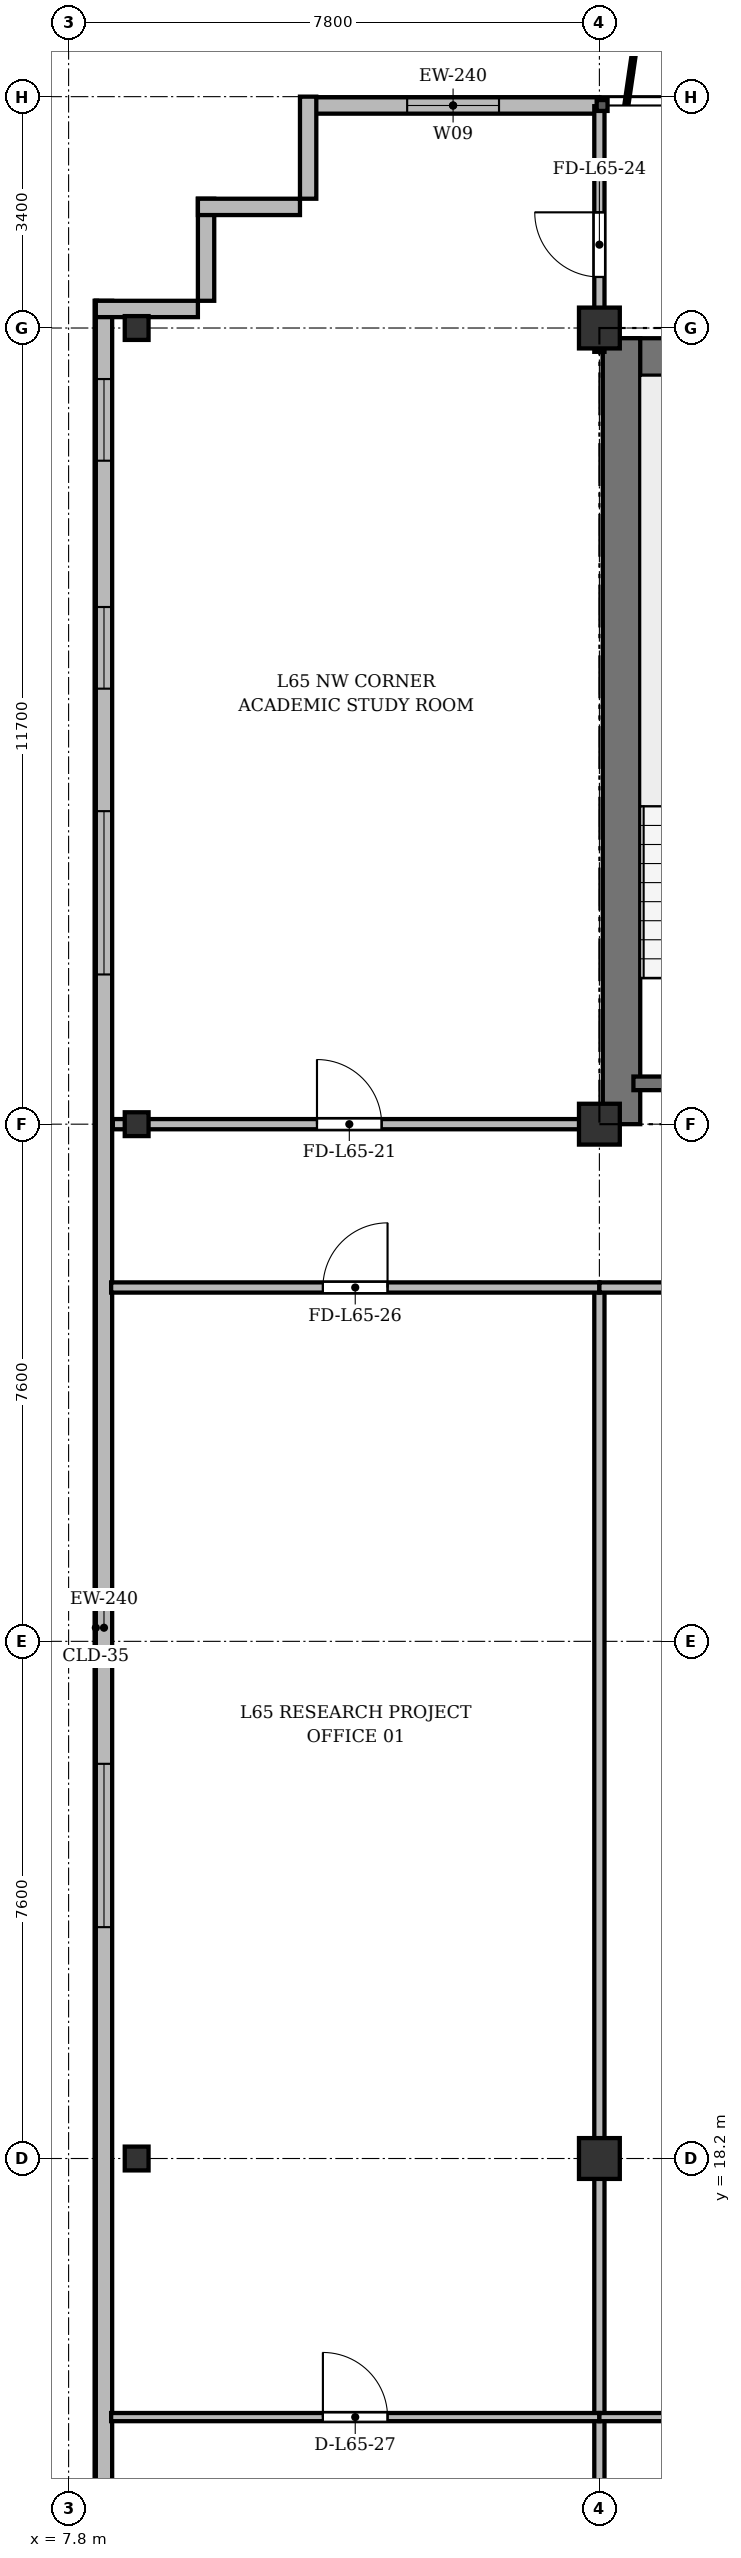
"""IFC4 building model, lengths in metres.
Left out: names, types, materials, properties, quantities, classifications, styles, units other than length and angle.
Written with IfcOpenShell. Run it as: python <this file> out.ifc"""

import sys

from ifc_helpers import new_model, si_unit, direction, frame, frame_2d, origin, origin_2d, place, context, subcontext, project, spatial, rectangle, i_section, extrude, source, transform, mapped, element, fill, save


model = new_model("IFC4")
c1 = context("Model", 3, precision=1e-05, world=origin(), true_north=direction((0.0, 1.0)))
c2 = subcontext(c1, "Body", "Model", "MODEL_VIEW")
j1 = project(units=[si_unit("LENGTHUNIT", "METRE"), si_unit("PLANEANGLEUNIT", "RADIAN")], contexts=[c1])
p1 = place(None, origin())
s1 = spatial("IfcSite", under=j1, at=p1, CompositionType="ELEMENT")
p2 = place(p1, origin())
s2 = spatial("IfcBuilding", under=s1, at=p2, CompositionType="ELEMENT")
p3 = place(p2, frame((0.0, 0.0, 252.3)))
s3 = spatial("IfcBuildingStorey", under=s2, at=p3, CompositionType="ELEMENT", Elevation=252.3)
m1 = source(origin(), c2, "Body", "SweptSolid", [
    extrude(i_section(OverallWidth=0.35, OverallDepth=0.35, WebThickness=0.018, FlangeThickness=0.028, at=origin_2d()), origin(), (0.0, 0.0, 1.0), 3.6),
])
for number, where, z_axis, x_axis in (
    (1, (8.8, 18.2, 0.0), (0.0, 0.0, 1.0), (1.0, 0.0, 0.0)),
    (2, (8.8, 33.4, 0.0), (0.0, 0.0, 1.0), (1.0, 0.0, 0.0)),
    (3, (8.8, 45.1, 0.0), (0.0, 0.0, 1.0), (1.0, 0.0, 0.0)),
):
    element("IfcColumn", number, at=place(p3, frame(where, z_axis=z_axis, x_axis=x_axis)), inside=s3, PredefinedType="COLUMN", context=c2, shape_type="MappedRepresentation", body=[
        mapped(m1, transform((0.0, 0.0, 0.0), x_axis=(1.0, 0.0, 0.0), y_axis=(0.0, 1.0, 0.0), z_axis=(0.0, 0.0, 1.0), scale=1.0)),
    ])
m2 = source(origin(), c2, "Body", "SweptSolid", [
    extrude(rectangle(XDim=0.6, YDim=0.6, at=origin_2d()), origin(), (0.0, 0.0, 1.0), 3.6),
])
for number, where, z_axis, x_axis in (
    (4, (15.6, 18.2, 0.0), (0.0, 0.0, 1.0), (1.0, 0.0, 0.0)),
    (5, (15.6, 33.4, 0.0), (0.0, 0.0, 1.0), (1.0, 0.0, 0.0)),
    (6, (15.6, 45.1, 0.0), (0.0, 0.0, 1.0), (1.0, 0.0, 0.0)),
):
    element("IfcColumn", number, at=place(p3, frame(where, z_axis=z_axis, x_axis=x_axis)), inside=s3, PredefinedType="COLUMN", context=c2, shape_type="MappedRepresentation", body=[
        mapped(m2, transform((0.0, 0.0, 0.0), x_axis=(1.0, 0.0, 0.0), y_axis=(0.0, 1.0, 0.0), z_axis=(0.0, 0.0, 1.0), scale=1.0)),
    ])
p4 = place(p3, frame((11.3, 48.37, 0.0), z_axis=(0.0, 0.0, 1.0), x_axis=(1.0, 0.0, 0.0)))
e7 = element("IfcWall", 7, at=p4, inside=s3, PredefinedType="SOLIDWALL", context=c2, shape_type="SweptSolid", body=[
    extrude(rectangle(XDim=4.3, YDim=0.24, at=frame_2d((2.15, 0.0))), origin(), (0.0, 0.0, 1.0), 3.37),
])
p5 = place(p4, frame((1.475, 0.0, 0.9)))
e8 = element("IfcOpeningElement", 8, at=p5, cuts=e7, PredefinedType="OPENING", context=c2, shape_type="SweptSolid", body=[
    extrude(rectangle(XDim=1.35, YDim=1.5, at=frame_2d((0.675, 0.75))), frame((0.0, 0.13, 0.0), z_axis=(0.0, -1.0, 0.0), x_axis=(1.0, 0.0, 0.0)), (0.0, 0.0, 1.0), 0.26),
])
p6 = place(p3, frame((8.32, 6.5, 0.0), z_axis=(0.0, 0.0, 1.0), x_axis=(0.0, 1.0, 0.0)))
e9 = element("IfcWall", 9, at=p6, inside=s3, PredefinedType="SOLIDWALL", context=c2, shape_type="SweptSolid", body=[
    extrude(rectangle(XDim=39.0, YDim=0.24, at=frame_2d((19.5, 0.0))), origin(), (0.0, 0.0, 1.0), 3.37),
])
p7 = place(p6, frame((1.45, 0.0, 0.92)))
e10 = element("IfcOpeningElement", 10, at=p7, cuts=e9, PredefinedType="OPENING", context=c2, shape_type="SweptSolid", body=[
    extrude(rectangle(XDim=1.2, YDim=1.65, at=frame_2d((0.6, 0.825))), frame((0.0, 0.13, 0.0), z_axis=(0.0, -1.0, 0.0), x_axis=(1.0, 0.0, 0.0)), (0.0, 0.0, 1.0), 0.26),
])
p8 = place(p6, frame((3.7, 0.0, 0.92)))
e11 = element("IfcOpeningElement", 11, at=p8, cuts=e9, PredefinedType="OPENING", context=c2, shape_type="SweptSolid", body=[
    extrude(rectangle(XDim=2.4, YDim=2.1, at=frame_2d((1.2, 1.05))), frame((0.0, 0.13, 0.0), z_axis=(0.0, -1.0, 0.0), x_axis=(1.0, 0.0, 0.0)), (0.0, 0.0, 1.0), 0.26),
])
p9 = place(p6, frame((15.1, 0.0, 0.92)))
e12 = element("IfcOpeningElement", 12, at=p9, cuts=e9, PredefinedType="OPENING", context=c2, shape_type="SweptSolid", body=[
    extrude(rectangle(XDim=2.4, YDim=2.1, at=frame_2d((1.2, 1.05))), frame((0.0, 0.13, 0.0), z_axis=(0.0, -1.0, 0.0), x_axis=(1.0, 0.0, 0.0)), (0.0, 0.0, 1.0), 0.26),
])
p10 = place(p6, frame((29.1, 0.0, 0.92)))
e13 = element("IfcOpeningElement", 13, at=p10, cuts=e9, PredefinedType="OPENING", context=c2, shape_type="SweptSolid", body=[
    extrude(rectangle(XDim=2.4, YDim=2.1, at=frame_2d((1.2, 1.05))), frame((0.0, 0.13, 0.0), z_axis=(0.0, -1.0, 0.0), x_axis=(1.0, 0.0, 0.0)), (0.0, 0.0, 1.0), 0.26),
])
p11 = place(p6, frame((33.3, 0.0, 0.92)))
e14 = element("IfcOpeningElement", 14, at=p11, cuts=e9, PredefinedType="OPENING", context=c2, shape_type="SweptSolid", body=[
    extrude(rectangle(XDim=1.2, YDim=1.65, at=frame_2d((0.6, 0.825))), frame((0.0, 0.13, 0.0), z_axis=(0.0, -1.0, 0.0), x_axis=(1.0, 0.0, 0.0)), (0.0, 0.0, 1.0), 0.26),
])
p12 = place(p6, frame((36.65, 0.0, 0.92)))
e15 = element("IfcOpeningElement", 15, at=p12, cuts=e9, PredefinedType="OPENING", context=c2, shape_type="SweptSolid", body=[
    extrude(rectangle(XDim=1.2, YDim=1.65, at=frame_2d((0.6, 0.825))), frame((0.0, 0.13, 0.0), z_axis=(0.0, -1.0, 0.0), x_axis=(1.0, 0.0, 0.0)), (0.0, 0.0, 1.0), 0.26),
])
for number, where, z_axis, x_axis in (
    (16, (8.2, 45.38, 0.0), (0.0, 0.0, 1.0), (1.0, 0.0, 0.0)),
    (17, (9.82, 45.5, 0.0), (0.0, 0.0, 1.0), (0.0, 1.0, 0.0)),
    (18, (9.7, 46.88, 0.0), (0.0, 0.0, 1.0), (1.0, 0.0, 0.0)),
    (19, (11.32, 47.0, 0.0), (0.0, 0.0, 1.0), (0.0, 1.0, 0.0)),
):
    element("IfcWall", number, at=place(p3, frame(where, z_axis=z_axis, x_axis=x_axis)), inside=s3, PredefinedType="SOLIDWALL", context=c2, shape_type="SweptSolid", body=[
        extrude(rectangle(XDim=1.5, YDim=0.24, at=frame_2d((0.75, 0.0))), origin(), (0.0, 0.0, 1.0), 3.37),
    ])
p13 = place(p3, frame((15.65, 44.675, 0.0), z_axis=(0.0, 0.0, 1.0), x_axis=(1.0, 0.0, 0.0)))
e20 = element("IfcWall", 20, at=p13, inside=s3, PredefinedType="SHEAR", context=c2, shape_type="SweptSolid", body=[
    extrude(rectangle(XDim=43.1, YDim=0.55, at=frame_2d((21.55, 0.0))), origin(), (0.0, 0.0, 1.0), 3.37),
])
p14 = place(p3, frame((15.925, 33.4, 0.0), z_axis=(0.0, 0.0, 1.0), x_axis=(0.0, 1.0, 0.0)))
e21 = element("IfcWall", 21, at=p14, inside=s3, PredefinedType="SHEAR", context=c2, shape_type="SweptSolid", body=[
    extrude(rectangle(XDim=11.55, YDim=0.55, at=frame_2d((5.775, 0.0))), origin(), (0.0, 0.0, 1.0), 3.37),
])
p15 = place(p3, frame((16.1, 34.0, 0.0), z_axis=(0.0, 0.0, 1.0), x_axis=(1.0, 0.0, 0.0)))
e22 = element("IfcWall", 22, at=p15, inside=s3, PredefinedType="SHEAR", context=c2, shape_type="SweptSolid", body=[
    extrude(rectangle(XDim=3.4, YDim=0.2, at=frame_2d((1.7, 0.0))), origin(), (0.0, 0.0, 1.0), 3.37),
])
p16 = place(p3, frame((8.45, 33.4, 0.0), z_axis=(0.0, 0.0, 1.0), x_axis=(1.0, 0.0, 0.0)))
e23 = element("IfcWall", 23, at=p16, inside=s3, PredefinedType="PARTITIONING", context=c2, shape_type="SweptSolid", body=[
    extrude(rectangle(XDim=7.15, YDim=0.15, at=frame_2d((3.575, 0.0))), origin(), (0.0, 0.0, 1.0), 2.92),
])
p17 = place(p16, frame((3.0, 0.0, 0.0)))
e24 = element("IfcOpeningElement", 24, at=p17, cuts=e23, PredefinedType="OPENING", context=c2, shape_type="SweptSolid", body=[
    extrude(rectangle(XDim=0.95, YDim=2.15, at=frame_2d((0.475, 1.075))), frame((0.0, 0.085, 0.0), z_axis=(0.0, -1.0, 0.0), x_axis=(1.0, 0.0, 0.0)), (0.0, 0.0, 1.0), 0.17),
])
p18 = place(p3, frame((15.6, 44.75, 0.0), z_axis=(0.0, 0.0, 1.0), x_axis=(0.0, 1.0, 0.0)))
e25 = element("IfcWall", 25, at=p18, inside=s3, PredefinedType="PARTITIONING", context=c2, shape_type="SweptSolid", body=[
    extrude(rectangle(XDim=3.61, YDim=0.15, at=frame_2d((1.805, 0.0))), origin(), (0.0, 0.0, 1.0), 2.87),
])
p19 = place(p18, frame((1.1, 0.0, 0.0)))
e26 = element("IfcOpeningElement", 26, at=p19, cuts=e25, PredefinedType="OPENING", context=c2, shape_type="SweptSolid", body=[
    extrude(rectangle(XDim=0.95, YDim=2.15, at=frame_2d((0.475, 1.075))), frame((0.0, 0.085, 0.0), z_axis=(0.0, -1.0, 0.0), x_axis=(1.0, 0.0, 0.0)), (0.0, 0.0, 1.0), 0.17),
])
p20 = place(p3, frame((15.6, 3.725, 0.0), z_axis=(0.0, 0.0, 1.0), x_axis=(0.0, 1.0, 0.0)))
e27 = element("IfcWall", 27, at=p20, inside=s3, PredefinedType="PARTITIONING", context=c2, shape_type="SweptSolid", body=[
    extrude(rectangle(XDim=27.275, YDim=0.15, at=frame_2d((13.637, 0.0))), origin(), (0.0, 0.0, 1.0), 2.87),
])
p21 = place(p3, frame((8.425, 31.0, 0.0), z_axis=(0.0, 0.0, 1.0), x_axis=(1.0, 0.0, 0.0)))
e28 = element("IfcWall", 28, at=p21, inside=s3, PredefinedType="PARTITIONING", context=c2, shape_type="SweptSolid", body=[
    extrude(rectangle(XDim=7.175, YDim=0.15, at=frame_2d((3.587, 0.0))), origin(), (0.0, 0.0, 1.0), 2.87),
])
p22 = place(p21, frame((3.112, 0.0, 0.0)))
e29 = element("IfcOpeningElement", 29, at=p22, cuts=e28, PredefinedType="OPENING", context=c2, shape_type="SweptSolid", body=[
    extrude(rectangle(XDim=0.95, YDim=2.15, at=frame_2d((0.475, 1.075))), frame((0.0, 0.085, 0.0), z_axis=(0.0, -1.0, 0.0), x_axis=(1.0, 0.0, 0.0)), (0.0, 0.0, 1.0), 0.17),
])
p23 = place(p3, frame((8.425, 14.4, 0.0), z_axis=(0.0, 0.0, 1.0), x_axis=(1.0, 0.0, 0.0)))
e30 = element("IfcWall", 30, at=p23, inside=s3, PredefinedType="PARTITIONING", context=c2, shape_type="SweptSolid", body=[
    extrude(rectangle(XDim=7.175, YDim=0.12, at=frame_2d((3.587, 0.0))), origin(), (0.0, 0.0, 1.0), 2.87),
])
p24 = place(p23, frame((3.112, 0.0, 0.0)))
e31 = element("IfcOpeningElement", 31, at=p24, cuts=e30, PredefinedType="OPENING", context=c2, shape_type="SweptSolid", body=[
    extrude(rectangle(XDim=0.95, YDim=2.15, at=frame_2d((0.475, 1.075))), frame((0.0, 0.07, 0.0), z_axis=(0.0, -1.0, 0.0), x_axis=(1.0, 0.0, 0.0)), (0.0, 0.0, 1.0), 0.14),
])
p25 = place(p3, frame((15.6, 31.0, 0.0), z_axis=(0.0, 0.0, 1.0), x_axis=(1.0, 0.0, 0.0)))
e32 = element("IfcWall", 32, at=p25, inside=s3, PredefinedType="PARTITIONING", context=c2, shape_type="SweptSolid", body=[
    extrude(rectangle(XDim=7.8, YDim=0.15, at=frame_2d((3.9, 0.0))), origin(), (0.0, 0.0, 1.0), 2.87),
])
p26 = place(p25, frame((3.333, 0.0, 0.0)))
e33 = element("IfcOpeningElement", 33, at=p26, cuts=e32, PredefinedType="OPENING", context=c2, shape_type="SweptSolid", body=[
    extrude(rectangle(XDim=0.95, YDim=2.15, at=frame_2d((0.475, 1.075))), frame((0.0, 0.085, 0.0), z_axis=(0.0, -1.0, 0.0), x_axis=(1.0, 0.0, 0.0)), (0.0, 0.0, 1.0), 0.17),
])
p27 = place(p3, frame((15.6, 14.4, 0.0), z_axis=(0.0, 0.0, 1.0), x_axis=(1.0, 0.0, 0.0)))
e34 = element("IfcWall", 34, at=p27, inside=s3, PredefinedType="PARTITIONING", context=c2, shape_type="SweptSolid", body=[
    extrude(rectangle(XDim=7.8, YDim=0.12, at=frame_2d((3.9, 0.0))), origin(), (0.0, 0.0, 1.0), 2.87),
])
p28 = place(p27, frame((3.333, 0.0, 0.0)))
e35 = element("IfcOpeningElement", 35, at=p28, cuts=e34, PredefinedType="OPENING", context=c2, shape_type="SweptSolid", body=[
    extrude(rectangle(XDim=0.95, YDim=2.15, at=frame_2d((0.475, 1.075))), frame((0.0, 0.07, 0.0), z_axis=(0.0, -1.0, 0.0), x_axis=(1.0, 0.0, 0.0)), (0.0, 0.0, 1.0), 0.14),
])
m3 = source(origin(), c2, "Body", "SweptSolid", [
    extrude(rectangle(XDim=1.35, YDim=1.5, at=frame_2d((0.675, 0.75))), frame((0.0, 0.03, 0.0), z_axis=(0.0, -1.0, 0.0), x_axis=(1.0, 0.0, 0.0)), (0.0, 0.0, 1.0), 0.06),
])
p29 = place(p5, origin())
e36 = element("IfcWindow", 36, at=p29, inside=s3, PartitioningType="SINGLE_PANEL", PredefinedType="WINDOW", context=c2, shape_type="MappedRepresentation", body=[
    mapped(m3, transform((0.0, 0.0, 0.0), x_axis=(1.0, 0.0, 0.0), y_axis=(0.0, 1.0, 0.0), z_axis=(0.0, 0.0, 1.0), scale=1.0)),
])
fill(e8, e36)
m4 = source(origin(), c2, "Body", "SweptSolid", [
    extrude(rectangle(XDim=2.4, YDim=2.1, at=frame_2d((1.2, 1.05))), frame((0.0, 0.03, 0.0), z_axis=(0.0, -1.0, 0.0), x_axis=(1.0, 0.0, 0.0)), (0.0, 0.0, 1.0), 0.06),
])
p30 = place(p9, origin())
e37 = element("IfcWindow", 37, at=p30, inside=s3, PartitioningType="SINGLE_PANEL", PredefinedType="WINDOW", context=c2, shape_type="MappedRepresentation", body=[
    mapped(m4, transform((0.0, 0.0, 0.0), x_axis=(1.0, 0.0, 0.0), y_axis=(0.0, 1.0, 0.0), z_axis=(0.0, 0.0, 1.0), scale=1.0)),
])
fill(e12, e37)
p31 = place(p10, origin())
e38 = element("IfcWindow", 38, at=p31, inside=s3, PartitioningType="SINGLE_PANEL", PredefinedType="WINDOW", context=c2, shape_type="MappedRepresentation", body=[
    mapped(m4, transform((0.0, 0.0, 0.0), x_axis=(1.0, 0.0, 0.0), y_axis=(0.0, 1.0, 0.0), z_axis=(0.0, 0.0, 1.0), scale=1.0)),
])
fill(e13, e38)
m5 = source(origin(), c2, "Body", "SweptSolid", [
    extrude(rectangle(XDim=1.2, YDim=1.65, at=frame_2d((0.6, 0.825))), frame((0.0, 0.03, 0.0), z_axis=(0.0, -1.0, 0.0), x_axis=(1.0, 0.0, 0.0)), (0.0, 0.0, 1.0), 0.06),
])
p32 = place(p11, origin())
e39 = element("IfcWindow", 39, at=p32, inside=s3, PartitioningType="SINGLE_PANEL", PredefinedType="WINDOW", context=c2, shape_type="MappedRepresentation", body=[
    mapped(m5, transform((0.0, 0.0, 0.0), x_axis=(1.0, 0.0, 0.0), y_axis=(0.0, 1.0, 0.0), z_axis=(0.0, 0.0, 1.0), scale=1.0)),
])
fill(e14, e39)
p33 = place(p12, origin())
e40 = element("IfcWindow", 40, at=p33, inside=s3, PartitioningType="SINGLE_PANEL", PredefinedType="WINDOW", context=c2, shape_type="MappedRepresentation", body=[
    mapped(m5, transform((0.0, 0.0, 0.0), x_axis=(1.0, 0.0, 0.0), y_axis=(0.0, 1.0, 0.0), z_axis=(0.0, 0.0, 1.0), scale=1.0)),
])
fill(e15, e40)
m6 = source(origin(), c2, "Body", "SweptSolid", [
    extrude(rectangle(XDim=0.95, YDim=2.15, at=frame_2d((0.475, 1.075))), frame((0.0, 0.025, 0.0), z_axis=(0.0, -1.0, 0.0), x_axis=(1.0, 0.0, 0.0)), (0.0, 0.0, 1.0), 0.05),
])
p34 = place(p17, origin())
e41 = element("IfcDoor", 41, at=p34, inside=s3, OperationType="SINGLE_SWING_LEFT", PredefinedType="DOOR", context=c2, shape_type="MappedRepresentation", body=[
    mapped(m6, transform((0.0, 0.0, 0.0), x_axis=(1.0, 0.0, 0.0), y_axis=(0.0, 1.0, 0.0), z_axis=(0.0, 0.0, 1.0), scale=1.0)),
])
fill(e24, e41)
p35 = place(p19, origin())
e42 = element("IfcDoor", 42, at=p35, inside=s3, OperationType="SINGLE_SWING_RIGHT", PredefinedType="DOOR", context=c2, shape_type="MappedRepresentation", body=[
    mapped(m6, transform((0.0, 0.0, 0.0), x_axis=(1.0, 0.0, 0.0), y_axis=(0.0, 1.0, 0.0), z_axis=(0.0, 0.0, 1.0), scale=1.0)),
])
fill(e26, e42)
p36 = place(p22, origin())
e43 = element("IfcDoor", 43, at=p36, inside=s3, OperationType="SINGLE_SWING_RIGHT", PredefinedType="DOOR", context=c2, shape_type="MappedRepresentation", body=[
    mapped(m6, transform((0.0, 0.0, 0.0), x_axis=(1.0, 0.0, 0.0), y_axis=(0.0, 1.0, 0.0), z_axis=(0.0, 0.0, 1.0), scale=1.0)),
])
fill(e29, e43)
p37 = place(p24, origin())
e44 = element("IfcDoor", 44, at=p37, inside=s3, OperationType="SINGLE_SWING_LEFT", PredefinedType="DOOR", context=c2, shape_type="MappedRepresentation", body=[
    mapped(m6, transform((0.0, 0.0, 0.0), x_axis=(1.0, 0.0, 0.0), y_axis=(0.0, 1.0, 0.0), z_axis=(0.0, 0.0, 1.0), scale=1.0)),
])
fill(e31, e44)
save(model, sys.argv[1])
